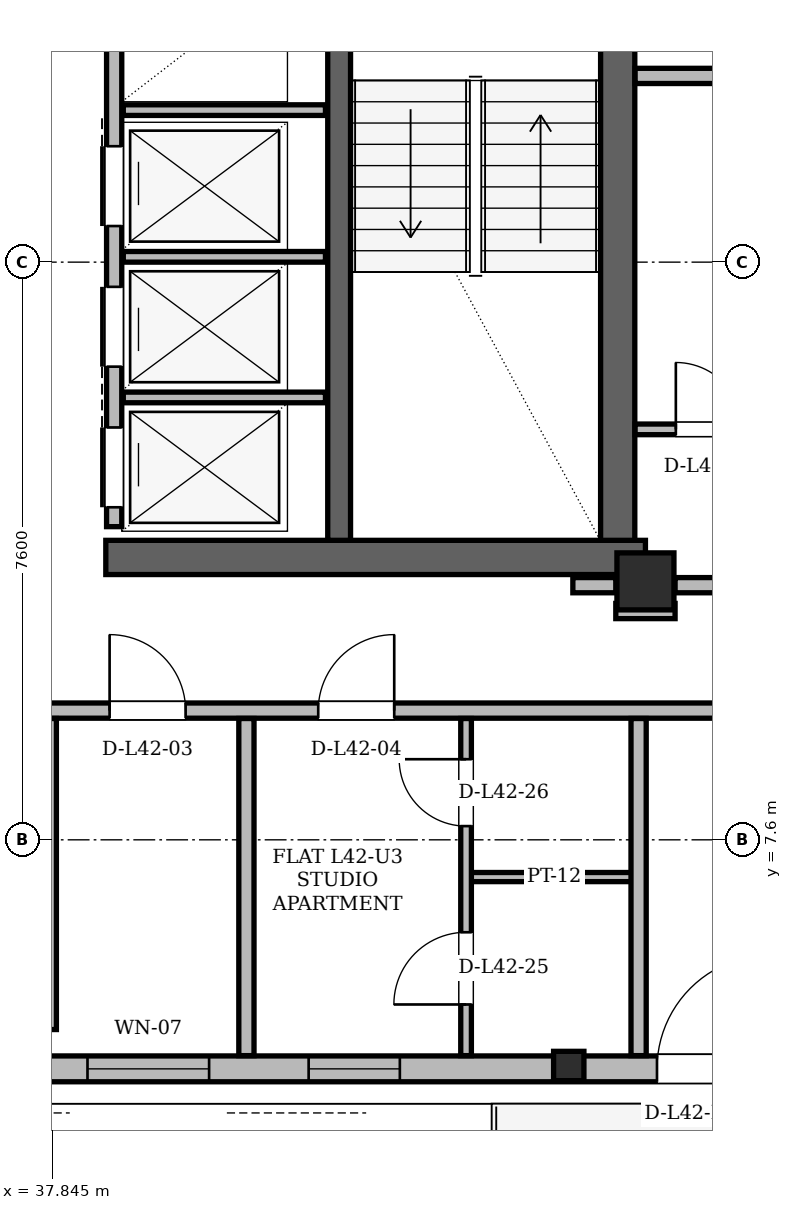
"""IFC4 building model, lengths in metres.
Left out: names, types, materials, properties, quantities, classifications, styles, units other than length and angle.
Written with IfcOpenShell. Run it as: python <this file> out.ifc"""

import sys

from ifc_helpers import new_model, si_unit, direction, frame, frame_2d, origin, origin_2d, place, context, subcontext, project, spatial, rectangle, hollow_rectangle, i_section, extrude, element, fill, save


model = new_model("IFC4")
c1 = context("Model", 3, precision=1e-05, world=origin(), true_north=direction((0.0, 1.0)))
c2 = subcontext(c1, "Body", "Model", "MODEL_VIEW")
j1 = project(units=[si_unit("LENGTHUNIT", "METRE"), si_unit("PLANEANGLEUNIT", "RADIAN")], contexts=[c1])
p1 = place(None, origin())
s1 = spatial("IfcSite", under=j1, at=p1, CompositionType="ELEMENT")
p2 = place(p1, origin())
s2 = spatial("IfcBuilding", under=s1, at=p2, CompositionType="ELEMENT")
p3 = place(p2, frame((0.0, 0.0, 160.2)))
s3 = spatial("IfcBuildingStorey", under=s2, at=p3, CompositionType="ELEMENT", Elevation=160.2)
p4 = place(p3, frame((45.65, 11.0, 0.0), z_axis=(0.0, 0.0, 1.0), x_axis=(1.0, 0.0, 0.0)))
e1 = element("IfcColumn", 1, at=p4, inside=s3, PredefinedType="COLUMN", context=c2, shape_type="SweptSolid", body=[
    extrude(hollow_rectangle(XDim=0.75, YDim=0.75, WallThickness=0.06, at=origin_2d()), origin(), (0.0, 0.0, 1.0), 3.6),
])
p5 = place(p3, frame((44.635, 4.587, 0.005), z_axis=(0.003670636596, 0.0210041983, 0.999772649196), x_axis=(-0.985071038124, 0.17214833676, 0.0)))
e2 = element("IfcColumn", 2, at=p5, inside=s3, PredefinedType="COLUMN", context=c2, shape_type="SweptSolid", body=[
    extrude(i_section(OverallWidth=0.399, OverallDepth=0.386, WebThickness=0.021, FlangeThickness=0.033, at=origin_2d()), origin(), (0.0, 0.0, 1.0), 3.592),
])
p6 = place(p3, frame((45.285, 11.0, 0.0), z_axis=(0.0, 0.0, 1.0), x_axis=(0.0, 1.0, 0.0)))
e3 = element("IfcWall", 3, at=p6, inside=s3, PredefinedType="SHEAR", context=c2, shape_type="SweptSolid", body=[
    extrude(rectangle(XDim=13.3, YDim=0.45, at=frame_2d((6.65, 0.0))), origin(), (0.0, 0.0, 1.0), 3.38),
])
p7 = place(p3, frame((38.55, 11.315, 0.0), z_axis=(0.0, 0.0, 1.0), x_axis=(1.0, 0.0, 0.0)))
e4 = element("IfcWall", 4, at=p7, inside=s3, PredefinedType="SHEAR", context=c2, shape_type="SweptSolid", body=[
    extrude(rectangle(XDim=7.1, YDim=0.45, at=frame_2d((3.55, 0.0))), origin(), (0.0, 0.0, 1.0), 3.38),
])
p8 = place(p3, frame((41.62, 11.54, 0.0), z_axis=(0.0, 0.0, 1.0), x_axis=(0.0, 1.0, 0.0)))
e5 = element("IfcWall", 5, at=p8, inside=s3, PredefinedType="SHEAR", context=c2, shape_type="SweptSolid", body=[
    extrude(rectangle(XDim=7.62, YDim=0.3, at=frame_2d((3.81, 0.0))), origin(), (0.0, 0.0, 1.0), 3.38),
])
p9 = place(p3, frame((19.664, 4.587, 0.0), z_axis=(0.0, 0.0, 1.0), x_axis=(1.0, 0.0, 0.0)))
e6 = element("IfcWall", 6, at=p9, inside=s3, PredefinedType="SOLIDWALL", context=c2, shape_type="SweptSolid", body=[
    extrude(rectangle(XDim=35.672, YDim=0.34, at=frame_2d((17.836, 0.0))), origin(), (0.0, 0.0, 1.0), 2.6),
])
p10 = place(p9, frame((6.579, 0.0, 0.0)))
e7 = element("IfcOpeningElement", 7, at=p10, cuts=e6, PredefinedType="OPENING", context=c2, shape_type="SweptSolid", body=[
    extrude(rectangle(XDim=1.5, YDim=2.2, at=frame_2d((0.75, 1.1))), frame((0.0, 0.17, 0.0), z_axis=(0.0, -1.0, 0.0), x_axis=(1.0, 0.0, 0.0)), (0.0, 0.0, 1.0), 0.34),
])
p11 = place(p9, frame((26.138, 0.0, 0.0)))
e8 = element("IfcOpeningElement", 8, at=p11, cuts=e6, PredefinedType="OPENING", context=c2, shape_type="SweptSolid", body=[
    extrude(rectangle(XDim=1.5, YDim=2.2, at=frame_2d((0.75, 1.1))), frame((0.0, 0.17, 0.0), z_axis=(0.0, -1.0, 0.0), x_axis=(1.0, 0.0, 0.0)), (0.0, 0.0, 1.0), 0.34),
])
p12 = place(p9, frame((1.81, 0.0, 0.85)))
e9 = element("IfcOpeningElement", 9, at=p12, cuts=e6, PredefinedType="OPENING", context=c2, shape_type="SweptSolid", body=[
    extrude(rectangle(XDim=2.6, YDim=1.64, at=frame_2d((1.3, 0.82))), frame((0.0, 0.17, 0.0), z_axis=(0.0, -1.0, 0.0), x_axis=(1.0, 0.0, 0.0)), (0.0, 0.0, 1.0), 0.34),
])
p13 = place(p9, frame((18.646, 0.0, 0.85)))
e10 = element("IfcOpeningElement", 10, at=p13, cuts=e6, PredefinedType="OPENING", context=c2, shape_type="SweptSolid", body=[
    extrude(rectangle(XDim=1.6, YDim=1.64, at=frame_2d((0.8, 0.82))), frame((0.0, 0.17, 0.0), z_axis=(0.0, -1.0, 0.0), x_axis=(1.0, 0.0, 0.0)), (0.0, 0.0, 1.0), 0.34),
])
p14 = place(p9, frame((31.853, 0.0, 0.85)))
e11 = element("IfcOpeningElement", 11, at=p14, cuts=e6, PredefinedType="OPENING", context=c2, shape_type="SweptSolid", body=[
    extrude(rectangle(XDim=1.6, YDim=1.64, at=frame_2d((0.8, 0.82))), frame((0.0, 0.17, 0.0), z_axis=(0.0, -1.0, 0.0), x_axis=(1.0, 0.0, 0.0)), (0.0, 0.0, 1.0), 0.34),
])
p15 = place(p9, frame((21.555, 0.0, 0.85)))
e12 = element("IfcOpeningElement", 12, at=p15, cuts=e6, PredefinedType="OPENING", context=c2, shape_type="SweptSolid", body=[
    extrude(rectangle(XDim=1.2, YDim=1.48, at=frame_2d((0.6, 0.74))), frame((0.0, 0.17, 0.0), z_axis=(0.0, -1.0, 0.0), x_axis=(1.0, 0.0, 0.0)), (0.0, 0.0, 1.0), 0.34),
])
p16 = place(p3, frame((59.853, 12.41, 0.0), z_axis=(0.0, 0.0, 1.0), x_axis=(-0.499995364632, 0.866028079999, 0.0)))
e13 = element("IfcWall", 13, at=p16, inside=s3, PredefinedType="SOLIDWALL", context=c2, shape_type="SweptSolid", body=[
    extrude(rectangle(XDim=35.673, YDim=0.34, at=frame_2d((17.836, 0.0))), origin(), (0.0, 0.0, 1.0), 2.6),
])
p17 = place(p16, frame((6.579, 0.0, 0.0)))
e14 = element("IfcOpeningElement", 14, at=p17, cuts=e13, PredefinedType="OPENING", context=c2, shape_type="SweptSolid", body=[
    extrude(rectangle(XDim=1.5, YDim=2.2, at=frame_2d((0.75, 1.1))), frame((0.0, 0.17, 0.0), z_axis=(0.0, -1.0, 0.0), x_axis=(1.0, 0.0, 0.0)), (0.0, 0.0, 1.0), 0.34),
])
p18 = place(p16, frame((26.238, 0.0, 0.0)))
e15 = element("IfcOpeningElement", 15, at=p18, cuts=e13, PredefinedType="OPENING", context=c2, shape_type="SweptSolid", body=[
    extrude(rectangle(XDim=1.3, YDim=2.2, at=frame_2d((0.65, 1.1))), frame((0.0, 0.17, 0.0), z_axis=(0.0, -1.0, 0.0), x_axis=(1.0, 0.0, 0.0)), (0.0, 0.0, 1.0), 0.34),
])
p19 = place(p16, frame((0.99, 0.0, 0.85)))
e16 = element("IfcOpeningElement", 16, at=p19, cuts=e13, PredefinedType="OPENING", context=c2, shape_type="SweptSolid", body=[
    extrude(rectangle(XDim=1.2, YDim=1.48, at=frame_2d((0.6, 0.74))), frame((0.0, 0.17, 0.0), z_axis=(0.0, -1.0, 0.0), x_axis=(1.0, 0.0, 0.0)), (0.0, 0.0, 1.0), 0.34),
])
p20 = place(p16, frame((2.449, 0.0, 0.85)))
e17 = element("IfcOpeningElement", 17, at=p20, cuts=e13, PredefinedType="OPENING", context=c2, shape_type="SweptSolid", body=[
    extrude(rectangle(XDim=1.2, YDim=1.48, at=frame_2d((0.6, 0.74))), frame((0.0, 0.17, 0.0), z_axis=(0.0, -1.0, 0.0), x_axis=(1.0, 0.0, 0.0)), (0.0, 0.0, 1.0), 0.34),
])
p21 = place(p16, frame((16.807, 0.0, 0.85)))
e18 = element("IfcOpeningElement", 18, at=p21, cuts=e13, PredefinedType="OPENING", context=c2, shape_type="SweptSolid", body=[
    extrude(rectangle(XDim=3.0, YDim=1.64, at=frame_2d((1.5, 0.82))), frame((0.0, 0.17, 0.0), z_axis=(0.0, -1.0, 0.0), x_axis=(1.0, 0.0, 0.0)), (0.0, 0.0, 1.0), 0.34),
])
p22 = place(p16, frame((22.859, 0.0, 0.85)))
e19 = element("IfcOpeningElement", 19, at=p22, cuts=e13, PredefinedType="OPENING", context=c2, shape_type="SweptSolid", body=[
    extrude(rectangle(XDim=1.2, YDim=1.48, at=frame_2d((0.6, 0.74))), frame((0.0, 0.17, 0.0), z_axis=(0.0, -1.0, 0.0), x_axis=(1.0, 0.0, 0.0)), (0.0, 0.0, 1.0), 0.34),
])
p23 = place(p16, frame((13.203, 0.0, 0.85)))
e20 = element("IfcOpeningElement", 20, at=p23, cuts=e13, PredefinedType="OPENING", context=c2, shape_type="SweptSolid", body=[
    extrude(rectangle(XDim=1.2, YDim=1.48, at=frame_2d((0.6, 0.74))), frame((0.0, 0.17, 0.0), z_axis=(0.0, -1.0, 0.0), x_axis=(1.0, 0.0, 0.0)), (0.0, 0.0, 1.0), 0.34),
])
p24 = place(p16, frame((31.37, 0.0, 0.85)))
e21 = element("IfcOpeningElement", 21, at=p24, cuts=e13, PredefinedType="OPENING", context=c2, shape_type="SweptSolid", body=[
    extrude(rectangle(XDim=3.0, YDim=1.64, at=frame_2d((1.5, 0.82))), frame((0.0, 0.17, 0.0), z_axis=(0.0, -1.0, 0.0), x_axis=(1.0, 0.0, 0.0)), (0.0, 0.0, 1.0), 0.34),
])
p25 = place(p3, frame((38.66, 11.72, 0.0), z_axis=(0.0, 0.0, 1.0), x_axis=(0.0, 1.0, 0.0)))
e22 = element("IfcWall", 22, at=p25, inside=s3, PredefinedType="PARTITIONING", context=c2, shape_type="SweptSolid", body=[
    extrude(rectangle(XDim=9.1, YDim=0.2, at=frame_2d((4.55, 0.0))), origin(), (0.0, 0.0, 1.0), 3.38),
])
p26 = place(p25, frame((0.255, 0.0, 0.0)))
e23 = element("IfcOpeningElement", 23, at=p26, cuts=e22, PredefinedType="OPENING", context=c2, shape_type="SweptSolid", body=[
    extrude(rectangle(XDim=1.05, YDim=2.15, at=frame_2d((0.525, 1.075))), frame((0.0, 0.1, 0.0), z_axis=(0.0, -1.0, 0.0), x_axis=(1.0, 0.0, 0.0)), (0.0, 0.0, 1.0), 0.2),
])
p27 = place(p25, frame((2.105, 0.0, 0.0)))
e24 = element("IfcOpeningElement", 24, at=p27, cuts=e22, PredefinedType="OPENING", context=c2, shape_type="SweptSolid", body=[
    extrude(rectangle(XDim=1.05, YDim=2.15, at=frame_2d((0.525, 1.075))), frame((0.0, 0.1, 0.0), z_axis=(0.0, -1.0, 0.0), x_axis=(1.0, 0.0, 0.0)), (0.0, 0.0, 1.0), 0.2),
])
p28 = place(p25, frame((3.955, 0.0, 0.0)))
e25 = element("IfcOpeningElement", 25, at=p28, cuts=e22, PredefinedType="OPENING", context=c2, shape_type="SweptSolid", body=[
    extrude(rectangle(XDim=1.05, YDim=2.15, at=frame_2d((0.525, 1.075))), frame((0.0, 0.1, 0.0), z_axis=(0.0, -1.0, 0.0), x_axis=(1.0, 0.0, 0.0)), (0.0, 0.0, 1.0), 0.2),
])
for number, where, z_axis, x_axis in (
    (26, (38.78, 13.42, 0.0), (0.0, 0.0, 1.0), (1.0, 0.0, 0.0)),
    (27, (38.78, 15.27, 0.0), (0.0, 0.0, 1.0), (1.0, 0.0, 0.0)),
    (28, (38.78, 17.2, 0.0), (0.0, 0.0, 1.0), (1.0, 0.0, 0.0)),
):
    element("IfcWall", number, at=place(p3, frame(where, z_axis=z_axis, x_axis=x_axis)), inside=s3, PredefinedType="PARTITIONING", context=c2, shape_type="SweptSolid", body=[
        extrude(rectangle(XDim=2.66, YDim=0.14, at=frame_2d((1.33, 0.0))), origin(), (0.0, 0.0, 1.0), 3.38),
    ])
p29 = place(p3, frame((43.29, 7.11, 0.0), z_axis=(0.0, 0.0, 1.0), x_axis=(1.0, 0.0, 0.0)))
e29 = element("IfcWall", 29, at=p29, inside=s3, PredefinedType="PARTITIONING", context=c2, shape_type="SweptSolid", body=[
    extrude(rectangle(XDim=2.321, YDim=0.12, at=frame_2d((1.16, 0.0))), origin(), (0.0, 0.0, 1.0), 3.38),
])
p30 = place(p3, frame((19.6, 9.3, 0.0), z_axis=(0.0, 0.0, 1.0), x_axis=(1.0, 0.0, 0.0)))
e30 = element("IfcWall", 30, at=p30, inside=s3, PredefinedType="PARTITIONING", context=c2, shape_type="SweptSolid", body=[
    extrude(rectangle(XDim=30.4, YDim=0.2, at=frame_2d((15.2, 0.0))), origin(), (0.0, 0.0, 1.0), 2.842),
])
p31 = place(p30, frame((4.345, 0.0, 0.0)))
e31 = element("IfcOpeningElement", 31, at=p31, cuts=e30, PredefinedType="OPENING", context=c2, shape_type="SweptSolid", body=[
    extrude(rectangle(XDim=1.0, YDim=2.18, at=frame_2d((0.5, 1.09))), frame((0.0, 0.1, 0.0), z_axis=(0.0, -1.0, 0.0), x_axis=(1.0, 0.0, 0.0)), (0.0, 0.0, 1.0), 0.2),
])
p32 = place(p30, frame((15.05, 0.0, 0.0)))
e32 = element("IfcOpeningElement", 32, at=p32, cuts=e30, PredefinedType="OPENING", context=c2, shape_type="SweptSolid", body=[
    extrude(rectangle(XDim=1.3, YDim=2.2, at=frame_2d((0.65, 1.1))), frame((0.0, 0.1, 0.0), z_axis=(0.0, -1.0, 0.0), x_axis=(1.0, 0.0, 0.0)), (0.0, 0.0, 1.0), 0.2),
])
p33 = place(p30, frame((19.0, 0.0, 0.0)))
e33 = element("IfcOpeningElement", 33, at=p33, cuts=e30, PredefinedType="OPENING", context=c2, shape_type="SweptSolid", body=[
    extrude(rectangle(XDim=1.0, YDim=2.18, at=frame_2d((0.5, 1.09))), frame((0.0, 0.1, 0.0), z_axis=(0.0, -1.0, 0.0), x_axis=(1.0, 0.0, 0.0)), (0.0, 0.0, 1.0), 0.2),
])
p34 = place(p30, frame((21.745, 0.0, 0.0)))
e34 = element("IfcOpeningElement", 34, at=p34, cuts=e30, PredefinedType="OPENING", context=c2, shape_type="SweptSolid", body=[
    extrude(rectangle(XDim=1.0, YDim=2.18, at=frame_2d((0.5, 1.09))), frame((0.0, 0.1, 0.0), z_axis=(0.0, -1.0, 0.0), x_axis=(1.0, 0.0, 0.0)), (0.0, 0.0, 1.0), 0.2),
])
p35 = place(p30, frame((28.532, 0.0, 0.0)))
e35 = element("IfcOpeningElement", 35, at=p35, cuts=e30, PredefinedType="OPENING", context=c2, shape_type="SweptSolid", body=[
    extrude(rectangle(XDim=1.0, YDim=2.18, at=frame_2d((0.5, 1.09))), frame((0.0, 0.1, 0.0), z_axis=(0.0, -1.0, 0.0), x_axis=(1.0, 0.0, 0.0)), (0.0, 0.0, 1.0), 0.2),
])
p36 = place(p3, frame((45.26, 10.61, 0.0), z_axis=(0.0, 0.0, 1.0), x_axis=(1.0, 0.0, 0.0)))
e36 = element("IfcWall", 36, at=p36, inside=s3, PredefinedType="PARTITIONING", context=c2, shape_type="SweptSolid", body=[
    extrude(rectangle(XDim=0.78, YDim=0.2, at=frame_2d((0.39, 0.0))), origin(), (0.0, 0.0, 1.0), 2.42),
])
p37 = place(p3, frame((44.695, 10.95, 0.0), z_axis=(0.0, 0.0, 1.0), x_axis=(1.0, 0.0, 0.0)))
e37 = element("IfcWall", 37, at=p37, inside=s3, PredefinedType="PARTITIONING", context=c2, shape_type="SweptSolid", body=[
    extrude(rectangle(XDim=0.565, YDim=0.2, at=frame_2d((0.282, 0.0))), origin(), (0.0, 0.0, 1.0), 2.42),
])
p38 = place(p3, frame((46.04, 10.95, 0.0), z_axis=(0.0, 0.0, 1.0), x_axis=(1.0, 0.0, 0.0)))
e38 = element("IfcWall", 38, at=p38, inside=s3, PredefinedType="PARTITIONING", context=c2, shape_type="SweptSolid", body=[
    extrude(rectangle(XDim=3.96, YDim=0.2, at=frame_2d((1.98, 0.0))), origin(), (0.0, 0.0, 1.0), 2.842),
])
p39 = place(p3, frame((45.514, 13.0, 0.0), z_axis=(0.0, 0.0, 1.0), x_axis=(1.0, 0.0, 0.0)))
e39 = element("IfcWall", 39, at=p39, inside=s3, PredefinedType="PARTITIONING", context=c2, shape_type="SweptSolid", body=[
    extrude(rectangle(XDim=13.798, YDim=0.14, at=frame_2d((6.899, 0.0))), origin(), (0.0, 0.0, 1.0), 2.42),
])
p40 = place(p39, frame((0.536, 0.0, 0.0)))
e40 = element("IfcOpeningElement", 40, at=p40, cuts=e39, PredefinedType="OPENING", context=c2, shape_type="SweptSolid", body=[
    extrude(rectangle(XDim=0.88, YDim=2.08, at=frame_2d((0.44, 1.04))), frame((0.0, 0.07, 0.0), z_axis=(0.0, -1.0, 0.0), x_axis=(1.0, 0.0, 0.0)), (0.0, 0.0, 1.0), 0.14),
])
p41 = place(p39, frame((2.486, 0.0, 0.0)))
e41 = element("IfcOpeningElement", 41, at=p41, cuts=e39, PredefinedType="OPENING", context=c2, shape_type="SweptSolid", body=[
    extrude(rectangle(XDim=0.95, YDim=2.1, at=frame_2d((0.475, 1.05))), frame((0.0, 0.07, 0.0), z_axis=(0.0, -1.0, 0.0), x_axis=(1.0, 0.0, 0.0)), (0.0, 0.0, 1.0), 0.14),
])
p42 = place(p39, frame((8.46, 0.0, 0.0)))
e42 = element("IfcOpeningElement", 42, at=p42, cuts=e39, PredefinedType="OPENING", context=c2, shape_type="SweptSolid", body=[
    extrude(rectangle(XDim=0.92, YDim=2.12, at=frame_2d((0.46, 1.06))), frame((0.0, 0.07, 0.0), z_axis=(0.0, -1.0, 0.0), x_axis=(1.0, 0.0, 0.0)), (0.0, 0.0, 1.0), 0.14),
])
p43 = place(p3, frame((45.514, 17.65, 0.0), z_axis=(0.0, 0.0, 1.0), x_axis=(1.0, 0.0, 0.0)))
e43 = element("IfcWall", 43, at=p43, inside=s3, PredefinedType="PARTITIONING", context=c2, shape_type="SweptSolid", body=[
    extrude(rectangle(XDim=11.113, YDim=0.2, at=frame_2d((5.557, 0.0))), origin(), (0.0, 0.0, 1.0), 2.42),
])
p44 = place(p3, frame((37.8, 5.104, 0.0), z_axis=(0.0, 0.0, 1.0), x_axis=(0.0, 1.0, 0.0)))
e44 = element("IfcWall", 44, at=p44, inside=s3, PredefinedType="PARTITIONING", context=c2, shape_type="SweptSolid", body=[
    extrude(rectangle(XDim=4.092, YDim=0.2, at=frame_2d((2.046, 0.0))), origin(), (0.0, 0.0, 1.0), 3.38),
])
p45 = place(p3, frame((40.4, 4.761, 0.0), z_axis=(0.0, 0.0, 1.0), x_axis=(0.0, 1.0, 0.0)))
e45 = element("IfcWall", 45, at=p45, inside=s3, PredefinedType="PARTITIONING", context=c2, shape_type="SweptSolid", body=[
    extrude(rectangle(XDim=4.435, YDim=0.2, at=frame_2d((2.218, 0.0))), origin(), (0.0, 0.0, 1.0), 3.38),
])
p46 = place(p3, frame((43.29, 4.761, 0.0), z_axis=(0.0, 0.0, 1.0), x_axis=(0.0, 1.0, 0.0)))
e46 = element("IfcWall", 46, at=p46, inside=s3, PredefinedType="PARTITIONING", context=c2, shape_type="SweptSolid", body=[
    extrude(rectangle(XDim=4.435, YDim=0.14, at=frame_2d((2.218, 0.0))), origin(), (0.0, 0.0, 1.0), 2.966),
])
p47 = place(p46, frame((0.673, 0.0, 0.0)))
e47 = element("IfcOpeningElement", 47, at=p47, cuts=e46, PredefinedType="OPENING", context=c2, shape_type="SweptSolid", body=[
    extrude(rectangle(XDim=0.95, YDim=2.1, at=frame_2d((0.475, 1.05))), frame((0.0, 0.07, 0.0), z_axis=(0.0, -1.0, 0.0), x_axis=(1.0, 0.0, 0.0)), (0.0, 0.0, 1.0), 0.14),
])
p48 = place(p46, frame((3.02, 0.0, 0.0)))
e48 = element("IfcOpeningElement", 48, at=p48, cuts=e46, PredefinedType="OPENING", context=c2, shape_type="SweptSolid", body=[
    extrude(rectangle(XDim=0.88, YDim=2.08, at=frame_2d((0.44, 1.04))), frame((0.0, 0.07, 0.0), z_axis=(0.0, -1.0, 0.0), x_axis=(1.0, 0.0, 0.0)), (0.0, 0.0, 1.0), 0.14),
])
p49 = place(p3, frame((45.56, 4.761, 0.0), z_axis=(0.0, 0.0, 1.0), x_axis=(0.0, 1.0, 0.0)))
e49 = element("IfcWall", 49, at=p49, inside=s3, PredefinedType="PARTITIONING", context=c2, shape_type="SweptSolid", body=[
    extrude(rectangle(XDim=4.435, YDim=0.2, at=frame_2d((2.218, 0.0))), origin(), (0.0, 0.0, 1.0), 2.966),
])
p50 = place(p11, origin())
e50 = element("IfcDoor", 50, at=p50, inside=s3, OperationType="SINGLE_SWING_RIGHT", PredefinedType="DOOR", context=c2, shape_type="SweptSolid", body=[
    extrude(rectangle(XDim=1.5, YDim=2.2, at=frame_2d((0.75, 1.1))), frame((0.0, 0.025, 0.0), z_axis=(0.0, -1.0, 0.0), x_axis=(1.0, 0.0, 0.0)), (0.0, 0.0, 1.0), 0.05),
])
fill(e8, e50)
p51 = place(p13, origin())
e51 = element("IfcWindow", 51, at=p51, inside=s3, PartitioningType="SINGLE_PANEL", PredefinedType="WINDOW", context=c2, shape_type="SweptSolid", body=[
    extrude(rectangle(XDim=1.6, YDim=1.64, at=frame_2d((0.8, 0.82))), frame((0.0, 0.03, 0.0), z_axis=(0.0, -1.0, 0.0), x_axis=(1.0, 0.0, 0.0)), (0.0, 0.0, 1.0), 0.06),
])
fill(e10, e51)
p52 = place(p15, origin())
e52 = element("IfcWindow", 52, at=p52, inside=s3, PartitioningType="SINGLE_PANEL", PredefinedType="WINDOW", context=c2, shape_type="SweptSolid", body=[
    extrude(rectangle(XDim=1.2, YDim=1.48, at=frame_2d((0.6, 0.74))), frame((0.0, 0.03, 0.0), z_axis=(0.0, -1.0, 0.0), x_axis=(1.0, 0.0, 0.0)), (0.0, 0.0, 1.0), 0.06),
])
fill(e12, e52)
p53 = place(p26, origin())
e53 = element("IfcDoor", 53, at=p53, inside=s3, OperationType="SLIDING_TO_RIGHT", PredefinedType="DOOR", context=c2, shape_type="SweptSolid", body=[
    extrude(rectangle(XDim=1.05, YDim=2.15, at=frame_2d((0.525, 1.075))), frame((0.0, 0.025, 0.0), z_axis=(0.0, -1.0, 0.0), x_axis=(1.0, 0.0, 0.0)), (0.0, 0.0, 1.0), 0.05),
])
fill(e23, e53)
p54 = place(p27, origin())
e54 = element("IfcDoor", 54, at=p54, inside=s3, OperationType="SLIDING_TO_LEFT", PredefinedType="DOOR", context=c2, shape_type="SweptSolid", body=[
    extrude(rectangle(XDim=1.05, YDim=2.15, at=frame_2d((0.525, 1.075))), frame((0.0, 0.025, 0.0), z_axis=(0.0, -1.0, 0.0), x_axis=(1.0, 0.0, 0.0)), (0.0, 0.0, 1.0), 0.05),
])
fill(e24, e54)
p55 = place(p28, origin())
e55 = element("IfcDoor", 55, at=p55, inside=s3, OperationType="SLIDING_TO_RIGHT", PredefinedType="DOOR", context=c2, shape_type="SweptSolid", body=[
    extrude(rectangle(XDim=1.05, YDim=2.15, at=frame_2d((0.525, 1.075))), frame((0.0, 0.025, 0.0), z_axis=(0.0, -1.0, 0.0), x_axis=(1.0, 0.0, 0.0)), (0.0, 0.0, 1.0), 0.05),
])
fill(e25, e55)
p56 = place(p33, origin())
e56 = element("IfcDoor", 56, at=p56, inside=s3, OperationType="SINGLE_SWING_LEFT", PredefinedType="DOOR", context=c2, shape_type="SweptSolid", body=[
    extrude(rectangle(XDim=1.0, YDim=2.18, at=frame_2d((0.5, 1.09))), frame((0.0, 0.025, 0.0), z_axis=(0.0, -1.0, 0.0), x_axis=(1.0, 0.0, 0.0)), (0.0, 0.0, 1.0), 0.05),
])
fill(e33, e56)
p57 = place(p34, origin())
e57 = element("IfcDoor", 57, at=p57, inside=s3, OperationType="SINGLE_SWING_RIGHT", PredefinedType="DOOR", context=c2, shape_type="SweptSolid", body=[
    extrude(rectangle(XDim=1.0, YDim=2.18, at=frame_2d((0.5, 1.09))), frame((0.0, 0.025, 0.0), z_axis=(0.0, -1.0, 0.0), x_axis=(1.0, 0.0, 0.0)), (0.0, 0.0, 1.0), 0.05),
])
fill(e34, e57)
p58 = place(p40, origin())
e58 = element("IfcDoor", 58, at=p58, inside=s3, OperationType="SINGLE_SWING_LEFT", PredefinedType="DOOR", context=c2, shape_type="SweptSolid", body=[
    extrude(rectangle(XDim=0.88, YDim=2.08, at=frame_2d((0.44, 1.04))), frame((0.0, 0.025, 0.0), z_axis=(0.0, -1.0, 0.0), x_axis=(1.0, 0.0, 0.0)), (0.0, 0.0, 1.0), 0.05),
])
fill(e40, e58)
p59 = place(p47, origin())
e59 = element("IfcDoor", 59, at=p59, inside=s3, OperationType="SINGLE_SWING_LEFT", PredefinedType="DOOR", context=c2, shape_type="SweptSolid", body=[
    extrude(rectangle(XDim=0.95, YDim=2.1, at=frame_2d((0.475, 1.05))), frame((0.0, 0.025, 0.0), z_axis=(0.0, -1.0, 0.0), x_axis=(1.0, 0.0, 0.0)), (0.0, 0.0, 1.0), 0.05),
])
fill(e47, e59)
p60 = place(p48, origin())
e60 = element("IfcDoor", 60, at=p60, inside=s3, OperationType="SINGLE_SWING_RIGHT", PredefinedType="DOOR", context=c2, shape_type="SweptSolid", body=[
    extrude(rectangle(XDim=0.88, YDim=2.08, at=frame_2d((0.44, 1.04))), frame((0.0, 0.025, 0.0), z_axis=(0.0, -1.0, 0.0), x_axis=(1.0, 0.0, 0.0)), (0.0, 0.0, 1.0), 0.05),
])
fill(e48, e60)
save(model, sys.argv[1])
